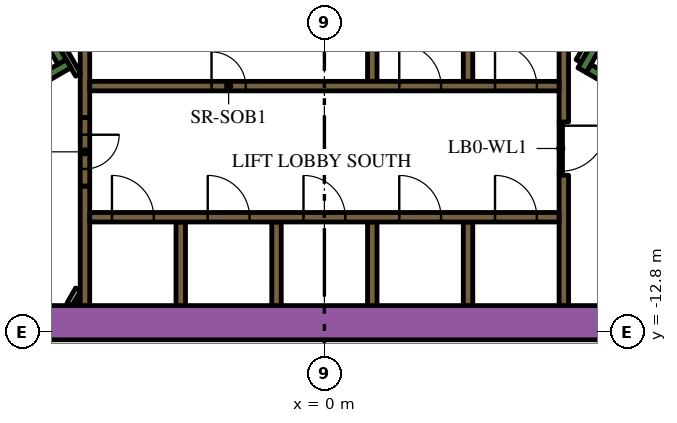
"""IFC4 building model, lengths in metres.
Left out: names, types, materials, properties, quantities, classifications, styles, units other than length and angle.
Written with IfcOpenShell. Run it as: python <this file> out.ifc"""

import sys

from ifc_helpers import new_model, si_unit, direction, frame, frame_2d, origin, place, context, subcontext, project, spatial, rectangle, extrude, element, fill, save


model = new_model("IFC4")
c1 = context("Model", 3, precision=1e-05, world=origin(), true_north=direction((0.0, 1.0)))
c2 = subcontext(c1, "Body", "Model", "MODEL_VIEW")
j1 = project(units=[si_unit("LENGTHUNIT", "METRE"), si_unit("PLANEANGLEUNIT", "RADIAN")], contexts=[c1])
p1 = place(None, origin())
s1 = spatial("IfcSite", under=j1, at=p1, CompositionType="ELEMENT")
p2 = place(p1, origin())
s2 = spatial("IfcBuilding", under=s1, at=p2, CompositionType="ELEMENT")
p3 = place(p2, frame((0.0, 0.0, 99.3)))
s3 = spatial("IfcBuildingStorey", under=s2, at=p3, CompositionType="ELEMENT", Elevation=99.3)
p4 = place(p3, frame((-12.019, -12.55, 0.0), z_axis=(0.0, 0.0, 1.0), x_axis=(1.0, 0.0, 0.0)))
e1 = element("IfcWall", 1, at=p4, inside=s3, PredefinedType="SOLIDWALL", context=c2, shape_type="SweptSolid", body=[
    extrude(rectangle(XDim=21.63, YDim=0.9, at=frame_2d((10.815, 0.0))), origin(), (0.0, 0.0, 1.0), 3.9),
])
p5 = place(p3, frame((12.84, -9.261, 0.0), z_axis=(0.0, 0.0, 1.0), x_axis=(-0.866013990052, 0.500019768644, 0.0)))
e2 = element("IfcWall", 2, at=p5, inside=s3, PredefinedType="SOLIDWALL", context=c2, shape_type="SweptSolid", body=[
    extrude(rectangle(XDim=6.8, YDim=0.25, at=frame_2d((3.4, 0.0))), origin(), (0.0, 0.0, 1.0), 3.9),
])
p6 = place(p3, frame((6.78, -5.906, 0.0), z_axis=(0.0, 0.0, 1.0), x_axis=(0.500223362819, 0.865896406789, 0.0)))
e3 = element("IfcWall", 3, at=p6, inside=s3, PredefinedType="SOLIDWALL", context=c2, shape_type="SweptSolid", body=[
    extrude(rectangle(XDim=0.675, YDim=0.25, at=frame_2d((0.337, 0.0))), origin(), (0.0, 0.0, 1.0), 3.9),
])
p7 = place(p3, frame((-12.84, -9.261, 0.0), z_axis=(0.0, 0.0, 1.0), x_axis=(0.866016039709, 0.500016218704, 0.0)))
e4 = element("IfcWall", 4, at=p7, inside=s3, PredefinedType="SOLIDWALL", context=c2, shape_type="SweptSolid", body=[
    extrude(rectangle(XDim=7.05, YDim=0.25, at=frame_2d((3.525, 0.0))), origin(), (0.0, 0.0, 1.0), 3.9),
])
p8 = place(p3, frame((-6.905, -5.69, 0.0), z_axis=(0.0, 0.0, 1.0), x_axis=(-0.500402024738, 0.865793170242, 0.0)))
e5 = element("IfcWall", 5, at=p8, inside=s3, PredefinedType="SOLIDWALL", context=c2, shape_type="SweptSolid", body=[
    extrude(rectangle(XDim=0.425, YDim=0.25, at=frame_2d((0.212, 0.0))), origin(), (0.0, 0.0, 1.0), 3.9),
])
p9 = place(p3, frame((-3.78, -12.1, 0.0), z_axis=(0.0, 0.0, 1.0), x_axis=(0.0, 1.0, 0.0)))
e6 = element("IfcWall", 6, at=p9, inside=s3, PredefinedType="SOLIDWALL", context=c2, shape_type="SweptSolid", body=[
    extrude(rectangle(XDim=2.2, YDim=0.25, at=frame_2d((1.1, 0.0))), origin(), (0.0, 0.0, 1.0), 3.9),
])
p10 = place(p3, frame((-6.3, -12.1, 0.0), z_axis=(0.0, 0.0, 1.0), x_axis=(0.0, 1.0, 0.0)))
e7 = element("IfcWall", 7, at=p10, inside=s3, PredefinedType="SOLIDWALL", context=c2, shape_type="SweptSolid", body=[
    extrude(rectangle(XDim=3.146, YDim=0.25, at=frame_2d((1.573, 0.0))), origin(), (0.0, 0.0, 1.0), 3.9),
])
p11 = place(p3, frame((6.3, -8.67, 0.0), z_axis=(0.0, 0.0, 1.0), x_axis=(0.0, -1.0, 0.0)))
e8 = element("IfcWall", 8, at=p11, inside=s3, PredefinedType="SOLIDWALL", context=c2, shape_type="SweptSolid", body=[
    extrude(rectangle(XDim=3.43, YDim=0.25, at=frame_2d((1.715, 0.0))), origin(), (0.0, 0.0, 1.0), 3.9),
])
p12 = place(p3, frame((6.3, -7.268, 0.0), z_axis=(0.0, 0.0, 1.0), x_axis=(0.0, 1.0, 0.0)))
e9 = element("IfcWall", 9, at=p12, inside=s3, PredefinedType="SOLIDWALL", context=c2, shape_type="SweptSolid", body=[
    extrude(rectangle(XDim=3.268, YDim=0.25, at=frame_2d((1.634, 0.0))), origin(), (0.0, 0.0, 1.0), 3.9),
])
for number, where, z_axis, x_axis in (
    (10, (3.78, -4.0, 0.0), (0.0, 0.0, 1.0), (0.0, -1.0, 0.0)),
    (11, (1.26, -4.0, 0.0), (0.0, 0.0, 1.0), (0.0, -1.0, 0.0)),
):
    element("IfcWall", number, at=place(p3, frame(where, z_axis=z_axis, x_axis=x_axis)), inside=s3, PredefinedType="SOLIDWALL", context=c2, shape_type="SweptSolid", body=[
        extrude(rectangle(XDim=2.2, YDim=0.25, at=frame_2d((1.1, 0.0))), origin(), (0.0, 0.0, 1.0), 3.9),
    ])
p13 = place(p3, frame((-6.3, -4.0, 0.0), z_axis=(0.0, 0.0, 1.0), x_axis=(0.0, -1.0, 0.0)))
e12 = element("IfcWall", 12, at=p13, inside=s3, PredefinedType="SOLIDWALL", context=c2, shape_type="SweptSolid", body=[
    extrude(rectangle(XDim=3.154, YDim=0.25, at=frame_2d((1.577, 0.0))), origin(), (0.0, 0.0, 1.0), 3.9),
])
for number, where, z_axis, x_axis in (
    (13, (3.78, -12.1, 0.0), (0.0, 0.0, 1.0), (0.0, 1.0, 0.0)),
    (14, (1.26, -12.1, 0.0), (0.0, 0.0, 1.0), (0.0, 1.0, 0.0)),
    (15, (-1.26, -12.1, 0.0), (0.0, 0.0, 1.0), (0.0, 1.0, 0.0)),
):
    element("IfcWall", number, at=place(p3, frame(where, z_axis=z_axis, x_axis=x_axis)), inside=s3, PredefinedType="SOLIDWALL", context=c2, shape_type="SweptSolid", body=[
        extrude(rectangle(XDim=2.2, YDim=0.25, at=frame_2d((1.1, 0.0))), origin(), (0.0, 0.0, 1.0), 3.9),
    ])
p14 = place(p3, frame((-6.708, -12.068, 0.0), z_axis=(0.0, 0.0, 1.0), x_axis=(0.500000789788, 0.8660249478, 0.0)))
e16 = element("IfcWall", 16, at=p14, inside=s3, PredefinedType="PARTITIONING", context=c2, shape_type="SweptSolid", body=[
    extrude(rectangle(XDim=0.456, YDim=0.15, at=frame_2d((0.228, 0.0))), origin(), (0.0, 0.0, 1.0), 2.75),
])
p15 = place(p3, frame((-6.534, -12.068, 0.0), z_axis=(0.0, 0.0, 1.0), x_axis=(0.500240224089, 0.865886665912, 0.0)))
e17 = element("IfcWall", 17, at=p15, inside=s3, PredefinedType="PARTITIONING", context=c2, shape_type="SweptSolid", body=[
    extrude(rectangle(XDim=0.109, YDim=0.15, at=frame_2d((0.054, 0.0))), origin(), (0.0, 0.0, 1.0), 2.75),
])
p16 = place(p3, frame((-6.48, -6.027, 0.0), z_axis=(0.0, 0.0, 1.0), x_axis=(-0.499927229454, 0.866067413802, 0.0)))
e18 = element("IfcWall", 18, at=p16, inside=s3, PredefinedType="PARTITIONING", context=c2, shape_type="SweptSolid", body=[
    extrude(rectangle(XDim=0.929, YDim=0.15, at=frame_2d((0.464, 0.0))), origin(), (0.0, 0.0, 1.0), 3.9),
])
p17 = place(p3, frame((6.945, -5.222, 0.0), z_axis=(0.0, 0.0, 1.0), x_axis=(-0.499818422106, -0.866130212453, 0.0)))
e19 = element("IfcWall", 19, at=p17, inside=s3, PredefinedType="PARTITIONING", context=c2, shape_type="SweptSolid", body=[
    extrude(rectangle(XDim=0.514, YDim=0.15, at=frame_2d((0.257, 0.0))), origin(), (0.0, 0.0, 1.0), 2.75),
])
p18 = place(p3, frame((-6.175, -9.775, 0.0), z_axis=(0.0, 0.0, 1.0), x_axis=(1.0, 0.0, 0.0)))
e20 = element("IfcWall", 20, at=p18, inside=s3, PredefinedType="SOLIDWALL", context=c2, shape_type="SweptSolid", body=[
    extrude(rectangle(XDim=12.35, YDim=0.25, at=frame_2d((6.175, 0.0))), origin(), (0.0, 0.0, 1.0), 3.9),
])
p19 = place(p18, frame((0.585, 0.0, 0.0)))
e21 = element("IfcOpeningElement", 21, at=p19, cuts=e20, PredefinedType="OPENING", context=c2, shape_type="SweptSolid", body=[
    extrude(rectangle(XDim=1.1, YDim=2.1, at=frame_2d((0.55, 1.05))), frame((0.0, 0.135, 0.0), z_axis=(0.0, -1.0, 0.0), x_axis=(1.0, 0.0, 0.0)), (0.0, 0.0, 1.0), 0.27),
])
p20 = place(p18, frame((3.105, 0.0, 0.0)))
e22 = element("IfcOpeningElement", 22, at=p20, cuts=e20, PredefinedType="OPENING", context=c2, shape_type="SweptSolid", body=[
    extrude(rectangle(XDim=1.1, YDim=2.1, at=frame_2d((0.55, 1.05))), frame((0.0, 0.135, 0.0), z_axis=(0.0, -1.0, 0.0), x_axis=(1.0, 0.0, 0.0)), (0.0, 0.0, 1.0), 0.27),
])
p21 = place(p18, frame((5.625, 0.0, 0.0)))
e23 = element("IfcOpeningElement", 23, at=p21, cuts=e20, PredefinedType="OPENING", context=c2, shape_type="SweptSolid", body=[
    extrude(rectangle(XDim=1.1, YDim=2.1, at=frame_2d((0.55, 1.05))), frame((0.0, 0.135, 0.0), z_axis=(0.0, -1.0, 0.0), x_axis=(1.0, 0.0, 0.0)), (0.0, 0.0, 1.0), 0.27),
])
p22 = place(p18, frame((8.145, 0.0, 0.0)))
e24 = element("IfcOpeningElement", 24, at=p22, cuts=e20, PredefinedType="OPENING", context=c2, shape_type="SweptSolid", body=[
    extrude(rectangle(XDim=1.1, YDim=2.1, at=frame_2d((0.55, 1.05))), frame((0.0, 0.135, 0.0), z_axis=(0.0, -1.0, 0.0), x_axis=(1.0, 0.0, 0.0)), (0.0, 0.0, 1.0), 0.27),
])
p23 = place(p18, frame((10.665, 0.0, 0.0)))
e25 = element("IfcOpeningElement", 25, at=p23, cuts=e20, PredefinedType="OPENING", context=c2, shape_type="SweptSolid", body=[
    extrude(rectangle(XDim=1.1, YDim=2.1, at=frame_2d((0.55, 1.05))), frame((0.0, 0.135, 0.0), z_axis=(0.0, -1.0, 0.0), x_axis=(1.0, 0.0, 0.0)), (0.0, 0.0, 1.0), 0.27),
])
p24 = place(p3, frame((-6.175, -6.325, 0.0), z_axis=(0.0, 0.0, 1.0), x_axis=(1.0, 0.0, 0.0)))
e26 = element("IfcWall", 26, at=p24, inside=s3, PredefinedType="SOLIDWALL", context=c2, shape_type="SweptSolid", body=[
    extrude(rectangle(XDim=12.35, YDim=0.25, at=frame_2d((6.175, 0.0))), origin(), (0.0, 0.0, 1.0), 3.9),
])
p25 = place(p24, frame((3.205, 0.0, 0.0)))
e27 = element("IfcOpeningElement", 27, at=p25, cuts=e26, PredefinedType="OPENING", context=c2, shape_type="SweptSolid", body=[
    extrude(rectangle(XDim=0.9, YDim=2.1, at=frame_2d((0.45, 1.05))), frame((0.0, 0.135, 0.0), z_axis=(0.0, -1.0, 0.0), x_axis=(1.0, 0.0, 0.0)), (0.0, 0.0, 1.0), 0.27),
])
p26 = place(p24, frame((8.145, 0.0, 0.0)))
e28 = element("IfcOpeningElement", 28, at=p26, cuts=e26, PredefinedType="OPENING", context=c2, shape_type="SweptSolid", body=[
    extrude(rectangle(XDim=1.1, YDim=2.1, at=frame_2d((0.55, 1.05))), frame((0.0, 0.135, 0.0), z_axis=(0.0, -1.0, 0.0), x_axis=(1.0, 0.0, 0.0)), (0.0, 0.0, 1.0), 0.27),
])
p27 = place(p24, frame((10.665, 0.0, 0.0)))
e29 = element("IfcOpeningElement", 29, at=p27, cuts=e26, PredefinedType="OPENING", context=c2, shape_type="SweptSolid", body=[
    extrude(rectangle(XDim=1.1, YDim=2.1, at=frame_2d((0.55, 1.05))), frame((0.0, 0.135, 0.0), z_axis=(0.0, -1.0, 0.0), x_axis=(1.0, 0.0, 0.0)), (0.0, 0.0, 1.0), 0.27),
])
p28 = place(p3, frame((-6.3, -7.154, 0.0), z_axis=(0.0, 0.0, 1.0), x_axis=(0.0, -1.0, 0.0)))
e30 = element("IfcWall", 30, at=p28, inside=s3, PredefinedType="SOLIDWALL", context=c2, shape_type="SweptSolid", body=[
    extrude(rectangle(XDim=1.8, YDim=0.25, at=frame_2d((0.9, 0.0))), origin(), (0.0, 0.0, 1.0), 3.9),
])
p29 = place(p28, frame((0.45, 0.0, 0.0)))
e31 = element("IfcOpeningElement", 31, at=p29, cuts=e30, PredefinedType="OPENING", context=c2, shape_type="SweptSolid", body=[
    extrude(rectangle(XDim=0.9, YDim=2.1, at=frame_2d((0.45, 1.05))), frame((0.0, 0.135, 0.0), z_axis=(0.0, -1.0, 0.0), x_axis=(1.0, 0.0, 0.0)), (0.0, 0.0, 1.0), 0.27),
])
p30 = place(p3, frame((6.22, -7.266, 0.0), z_axis=(0.0, 0.0, 1.0), x_axis=(0.0, -1.0, 0.0)))
e32 = element("IfcWall", 32, at=p30, inside=s3, PredefinedType="PARTITIONING", context=c2, shape_type="SweptSolid", body=[
    extrude(rectangle(XDim=1.4, YDim=0.09, at=frame_2d((0.7, 0.0))), origin(), (0.0, 0.0, 1.0), 2.75),
])
p31 = place(p30, frame((0.1, 0.0, 0.0)))
e33 = element("IfcOpeningElement", 33, at=p31, cuts=e32, PredefinedType="OPENING", context=c2, shape_type="SweptSolid", body=[
    extrude(rectangle(XDim=1.2, YDim=2.1, at=frame_2d((0.6, 1.05))), frame((0.0, 0.055, 0.0), z_axis=(0.0, -1.0, 0.0), x_axis=(1.0, 0.0, 0.0)), (0.0, 0.0, 1.0), 0.11),
])
p32 = place(p19, origin())
e34 = element("IfcDoor", 34, at=p32, inside=s3, OperationType="DOUBLE_DOOR_SLIDING", PredefinedType="DOOR", context=c2, shape_type="SweptSolid", body=[
    extrude(rectangle(XDim=1.1, YDim=2.1, at=frame_2d((0.55, 1.05))), frame((0.0, 0.025, 0.0), z_axis=(0.0, -1.0, 0.0), x_axis=(1.0, 0.0, 0.0)), (0.0, 0.0, 1.0), 0.05),
])
fill(e21, e34)
p33 = place(p20, origin())
e35 = element("IfcDoor", 35, at=p33, inside=s3, OperationType="DOUBLE_DOOR_SLIDING", PredefinedType="DOOR", context=c2, shape_type="SweptSolid", body=[
    extrude(rectangle(XDim=1.1, YDim=2.1, at=frame_2d((0.55, 1.05))), frame((0.0, 0.025, 0.0), z_axis=(0.0, -1.0, 0.0), x_axis=(1.0, 0.0, 0.0)), (0.0, 0.0, 1.0), 0.05),
])
fill(e22, e35)
p34 = place(p21, origin())
e36 = element("IfcDoor", 36, at=p34, inside=s3, OperationType="DOUBLE_DOOR_SLIDING", PredefinedType="DOOR", context=c2, shape_type="SweptSolid", body=[
    extrude(rectangle(XDim=1.1, YDim=2.1, at=frame_2d((0.55, 1.05))), frame((0.0, 0.025, 0.0), z_axis=(0.0, -1.0, 0.0), x_axis=(1.0, 0.0, 0.0)), (0.0, 0.0, 1.0), 0.05),
])
fill(e23, e36)
p35 = place(p22, origin())
e37 = element("IfcDoor", 37, at=p35, inside=s3, OperationType="DOUBLE_DOOR_SLIDING", PredefinedType="DOOR", context=c2, shape_type="SweptSolid", body=[
    extrude(rectangle(XDim=1.1, YDim=2.1, at=frame_2d((0.55, 1.05))), frame((0.0, 0.025, 0.0), z_axis=(0.0, -1.0, 0.0), x_axis=(1.0, 0.0, 0.0)), (0.0, 0.0, 1.0), 0.05),
])
fill(e24, e37)
p36 = place(p23, origin())
e38 = element("IfcDoor", 38, at=p36, inside=s3, OperationType="DOUBLE_DOOR_SLIDING", PredefinedType="DOOR", context=c2, shape_type="SweptSolid", body=[
    extrude(rectangle(XDim=1.1, YDim=2.1, at=frame_2d((0.55, 1.05))), frame((0.0, 0.025, 0.0), z_axis=(0.0, -1.0, 0.0), x_axis=(1.0, 0.0, 0.0)), (0.0, 0.0, 1.0), 0.05),
])
fill(e25, e38)
p37 = place(p25, origin())
e39 = element("IfcDoor", 39, at=p37, inside=s3, OperationType="SINGLE_SWING_LEFT", PredefinedType="DOOR", context=c2, shape_type="SweptSolid", body=[
    extrude(rectangle(XDim=0.9, YDim=2.1, at=frame_2d((0.45, 1.05))), frame((0.0, 0.025, 0.0), z_axis=(0.0, -1.0, 0.0), x_axis=(1.0, 0.0, 0.0)), (0.0, 0.0, 1.0), 0.05),
])
fill(e27, e39)
p38 = place(p26, origin())
e40 = element("IfcDoor", 40, at=p38, inside=s3, OperationType="DOUBLE_DOOR_SLIDING", PredefinedType="DOOR", context=c2, shape_type="SweptSolid", body=[
    extrude(rectangle(XDim=1.1, YDim=2.1, at=frame_2d((0.55, 1.05))), frame((0.0, 0.025, 0.0), z_axis=(0.0, -1.0, 0.0), x_axis=(1.0, 0.0, 0.0)), (0.0, 0.0, 1.0), 0.05),
])
fill(e28, e40)
p39 = place(p27, origin())
e41 = element("IfcDoor", 41, at=p39, inside=s3, OperationType="DOUBLE_DOOR_SLIDING", PredefinedType="DOOR", context=c2, shape_type="SweptSolid", body=[
    extrude(rectangle(XDim=1.1, YDim=2.1, at=frame_2d((0.55, 1.05))), frame((0.0, 0.025, 0.0), z_axis=(0.0, -1.0, 0.0), x_axis=(1.0, 0.0, 0.0)), (0.0, 0.0, 1.0), 0.05),
])
fill(e29, e41)
p40 = place(p29, origin())
e42 = element("IfcDoor", 42, at=p40, inside=s3, OperationType="SINGLE_SWING_LEFT", PredefinedType="DOOR", context=c2, shape_type="SweptSolid", body=[
    extrude(rectangle(XDim=0.9, YDim=2.1, at=frame_2d((0.45, 1.05))), frame((0.0, 0.025, 0.0), z_axis=(0.0, -1.0, 0.0), x_axis=(1.0, 0.0, 0.0)), (0.0, 0.0, 1.0), 0.05),
])
fill(e31, e42)
p41 = place(p31, origin())
e43 = element("IfcDoor", 43, at=p41, inside=s3, OperationType="SINGLE_SWING_LEFT", PredefinedType="DOOR", context=c2, shape_type="SweptSolid", body=[
    extrude(rectangle(XDim=1.2, YDim=2.1, at=frame_2d((0.6, 1.05))), frame((0.0, 0.025, 0.0), z_axis=(0.0, -1.0, 0.0), x_axis=(1.0, 0.0, 0.0)), (0.0, 0.0, 1.0), 0.05),
])
fill(e33, e43)
save(model, sys.argv[1])
